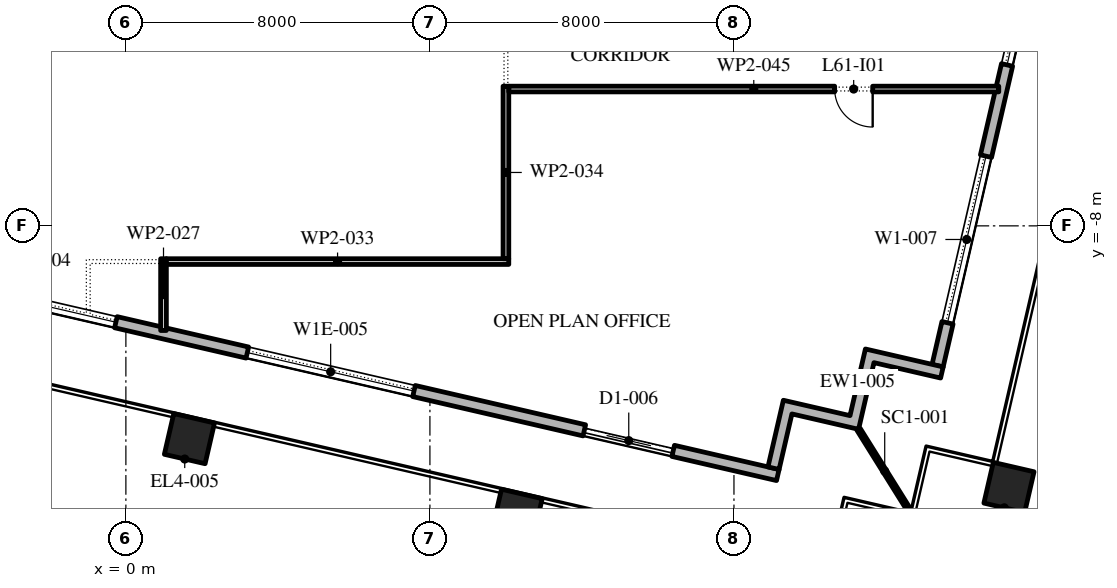
"""IFC4 building model, lengths in metres.
Left out: names, types, materials, properties, quantities, classifications, styles, units other than length and angle.
Written with IfcOpenShell. Run it as: python <this file> out.ifc"""

import sys

from ifc_helpers import new_model, si_unit, direction, frame, frame_2d, origin, origin_2d, place, context, subcontext, project, spatial, polyline, rectangle, outline, extrude, element, fill, save


model = new_model("IFC4")
c1 = context("Model", 3, precision=1e-05, world=origin(), true_north=direction((0.0, 1.0)))
c2 = subcontext(c1, "Body", "Model", "MODEL_VIEW")
j1 = project(units=[si_unit("LENGTHUNIT", "METRE"), si_unit("PLANEANGLEUNIT", "RADIAN")], contexts=[c1])
p1 = place(None, origin())
s1 = spatial("IfcSite", under=j1, at=p1, CompositionType="ELEMENT")
p2 = place(p1, origin())
s2 = spatial("IfcBuilding", under=s1, at=p2, CompositionType="ELEMENT")
p3 = place(p2, frame((0.0, 0.0, 280.8)))
s3 = spatial("IfcBuildingStorey", under=s2, at=p3, CompositionType="ELEMENT", Elevation=280.8)
for number, where, z_axis, x_axis in (
    (1, (1.672, -13.599, 0.0), (0.0, 0.0, 1.0), (0.974, -0.225, 0.0)),
    (2, (10.295, -15.59, 0.0), (0.0, 0.0, 1.0), (0.974, -0.225, 0.0)),
    (3, (23.236, -14.883, 0.0), (0.0, 0.0, 1.0), (0.974, -0.225, 0.0)),
):
    element("IfcColumn", number, at=place(p3, frame(where, z_axis=z_axis, x_axis=x_axis)), inside=s3, PredefinedType="COLUMN", context=c2, shape_type="SweptSolid", body=[
        extrude(rectangle(XDim=1.1, YDim=1.1, at=origin_2d()), origin(), (0.0, 0.0, 1.0), 4.2),
    ])
p4 = place(p3, frame((-29.616, -3.758, 0.0), z_axis=(0.0, 0.0, 1.0), x_axis=(0.974370532314, -0.224949029246, 0.0)))
e4 = element("IfcWall", 4, at=p4, inside=s3, PredefinedType="STANDARD", context=c2, shape_type="SweptSolid", body=[
    extrude(rectangle(XDim=48.0, YDim=0.3, at=frame_2d((24.0, 0.0))), origin(), (0.0, 0.0, 1.0), 4.0),
])
p5 = place(p4, frame((1.625, 0.0, 0.45)))
e5 = element("IfcOpeningElement", 5, at=p5, cuts=e4, PredefinedType="OPENING", context=c2, shape_type="SweptSolid", body=[
    extrude(rectangle(XDim=4.5, YDim=3.05, at=frame_2d((2.25, 1.525))), frame((0.0, 0.16, 0.0), z_axis=(0.0, -1.0, 0.0), x_axis=(1.0, 0.0, 0.0)), (0.0, 0.0, 1.0), 0.32),
])
p6 = place(p4, frame((10.575, 0.0, 0.0)))
e6 = element("IfcOpeningElement", 6, at=p6, cuts=e4, PredefinedType="OPENING", context=c2, shape_type="SweptSolid", body=[
    extrude(rectangle(XDim=2.4, YDim=3.5, at=frame_2d((1.2, 1.75))), frame((0.0, 0.16, 0.0), z_axis=(0.0, -1.0, 0.0), x_axis=(1.0, 0.0, 0.0)), (0.0, 0.0, 1.0), 0.32),
])
p7 = place(p4, frame((17.575, 0.0, 0.45)))
e7 = element("IfcOpeningElement", 7, at=p7, cuts=e4, PredefinedType="OPENING", context=c2, shape_type="SweptSolid", body=[
    extrude(rectangle(XDim=4.5, YDim=3.0, at=frame_2d((2.25, 1.5))), frame((0.0, 0.16, 0.0), z_axis=(0.0, -1.0, 0.0), x_axis=(1.0, 0.0, 0.0)), (0.0, 0.0, 1.0), 0.32),
])
p8 = place(p4, frame((25.625, 0.0, 0.45)))
e8 = element("IfcOpeningElement", 8, at=p8, cuts=e4, PredefinedType="OPENING", context=c2, shape_type="SweptSolid", body=[
    extrude(rectangle(XDim=4.5, YDim=2.95, at=frame_2d((2.25, 1.475))), frame((0.0, 0.16, 0.0), z_axis=(0.0, -1.0, 0.0), x_axis=(1.0, 0.0, 0.0)), (0.0, 0.0, 1.0), 0.32),
])
p9 = place(p4, frame((33.675, 0.0, 0.45)))
e9 = element("IfcOpeningElement", 9, at=p9, cuts=e4, PredefinedType="OPENING", context=c2, shape_type="SweptSolid", body=[
    extrude(rectangle(XDim=4.5, YDim=2.825, at=frame_2d((2.25, 1.413))), frame((0.0, 0.16, 0.0), z_axis=(0.0, -1.0, 0.0), x_axis=(1.0, 0.0, 0.0)), (0.0, 0.0, 1.0), 0.32),
])
p10 = place(p4, frame((42.775, 0.0, 0.0)))
e10 = element("IfcOpeningElement", 10, at=p10, cuts=e4, PredefinedType="OPENING", context=c2, shape_type="SweptSolid", body=[
    extrude(rectangle(XDim=2.4, YDim=3.5, at=frame_2d((1.2, 1.75))), frame((0.0, 0.16, 0.0), z_axis=(0.0, -1.0, 0.0), x_axis=(1.0, 0.0, 0.0)), (0.0, 0.0, 1.0), 0.32),
])
p11 = place(p3, frame((21.359, -11.678, 0.0), z_axis=(0.0, 0.0, 1.0), x_axis=(0.224949198343, 0.974370493275, 0.0)))
e11 = element("IfcWall", 11, at=p11, inside=s3, PredefinedType="STANDARD", context=c2, shape_type="SweptSolid", body=[
    extrude(rectangle(XDim=49.5, YDim=0.3, at=frame_2d((24.75, 0.0))), origin(), (0.0, 0.0, 1.0), 4.0),
])
p12 = place(p11, frame((1.157, 0.0, 0.45)))
e12 = element("IfcOpeningElement", 12, at=p12, cuts=e11, PredefinedType="OPENING", context=c2, shape_type="SweptSolid", body=[
    extrude(rectangle(XDim=4.5, YDim=3.05, at=frame_2d((2.25, 1.525))), frame((0.0, 0.16, 0.0), z_axis=(0.0, -1.0, 0.0), x_axis=(1.0, 0.0, 0.0)), (0.0, 0.0, 1.0), 0.32),
])
p13 = place(p11, frame((8.121, 0.0, 0.45)))
e13 = element("IfcOpeningElement", 13, at=p13, cuts=e11, PredefinedType="OPENING", context=c2, shape_type="SweptSolid", body=[
    extrude(rectangle(XDim=4.5, YDim=3.05, at=frame_2d((2.25, 1.525))), frame((0.0, 0.16, 0.0), z_axis=(0.0, -1.0, 0.0), x_axis=(1.0, 0.0, 0.0)), (0.0, 0.0, 1.0), 0.32),
])
p14 = place(p11, frame((15.236, 0.0, 0.45)))
e14 = element("IfcOpeningElement", 14, at=p14, cuts=e11, PredefinedType="OPENING", context=c2, shape_type="SweptSolid", body=[
    extrude(rectangle(XDim=4.5, YDim=3.05, at=frame_2d((2.25, 1.525))), frame((0.0, 0.16, 0.0), z_axis=(0.0, -1.0, 0.0), x_axis=(1.0, 0.0, 0.0)), (0.0, 0.0, 1.0), 0.32),
])
p15 = place(p11, frame((22.35, 0.0, 0.45)))
e15 = element("IfcOpeningElement", 15, at=p15, cuts=e11, PredefinedType="OPENING", context=c2, shape_type="SweptSolid", body=[
    extrude(rectangle(XDim=4.5, YDim=3.05, at=frame_2d((2.25, 1.525))), frame((0.0, 0.16, 0.0), z_axis=(0.0, -1.0, 0.0), x_axis=(1.0, 0.0, 0.0)), (0.0, 0.0, 1.0), 0.32),
])
p16 = place(p11, frame((29.464, 0.0, 0.45)))
e16 = element("IfcOpeningElement", 16, at=p16, cuts=e11, PredefinedType="OPENING", context=c2, shape_type="SweptSolid", body=[
    extrude(rectangle(XDim=4.5, YDim=2.95, at=frame_2d((2.25, 1.475))), frame((0.0, 0.16, 0.0), z_axis=(0.0, -1.0, 0.0), x_axis=(1.0, 0.0, 0.0)), (0.0, 0.0, 1.0), 0.32),
])
p17 = place(p11, frame((37.628, 0.0, 0.0)))
e17 = element("IfcOpeningElement", 17, at=p17, cuts=e11, PredefinedType="OPENING", context=c2, shape_type="SweptSolid", body=[
    extrude(rectangle(XDim=2.4, YDim=3.325, at=frame_2d((1.2, 1.663))), frame((0.0, 0.16, 0.0), z_axis=(0.0, -1.0, 0.0), x_axis=(1.0, 0.0, 0.0)), (0.0, 0.0, 1.0), 0.32),
])
p18 = place(p11, frame((43.693, 0.0, 0.45)))
e18 = element("IfcOpeningElement", 18, at=p18, cuts=e11, PredefinedType="OPENING", context=c2, shape_type="SweptSolid", body=[
    extrude(rectangle(XDim=4.5, YDim=2.575, at=frame_2d((2.25, 1.288))), frame((0.0, 0.16, 0.0), z_axis=(0.0, -1.0, 0.0), x_axis=(1.0, 0.0, 0.0)), (0.0, 0.0, 1.0), 0.32),
])
p19 = place(p3, origin())
e19 = element("IfcWall", 19, at=p19, inside=s3, PredefinedType="STANDARD", context=c2, shape_type="SweptSolid", body=[
    extrude(outline(polyline([(19.054, -12.993), (19.459, -11.24), (21.505, -11.712), (21.438, -12.004), (19.684, -11.599), (19.279, -13.353), (17.525, -12.948), (17.188, -14.41), (16.895, -14.342), (17.3, -12.588), (19.054, -12.993)])), origin(), (0.0, 0.0, 1.0), 4.0),
])
p20 = place(p3, frame((19.279, -13.353, -0.05), z_axis=(0.0, 0.0, 1.0), x_axis=(0.529914407191, -0.848051131154, 0.0)))
e20 = element("IfcWall", 20, at=p20, inside=s3, PredefinedType="STANDARD", context=c2, shape_type="SweptSolid", body=[
    extrude(rectangle(XDim=2.596, YDim=0.1, at=frame_2d((1.298, 0.0))), origin(), (0.0, 0.0, 1.0), 4.05),
])
p21 = place(p3, frame((0.99, -8.865, 0.0), z_axis=(0.0, 0.0, 1.0), x_axis=(0.0, -1.0, 0.0)))
e21 = element("IfcWall", 21, at=p21, inside=s3, PredefinedType="PARTITIONING", context=c2, shape_type="SweptSolid", body=[
    extrude(rectangle(XDim=1.888, YDim=0.15, at=frame_2d((0.944, 0.0))), origin(), (0.0, 0.0, 1.0), 4.0),
])
p22 = place(p3, frame((10.075, -8.94, 0.0), z_axis=(0.0, 0.0, 1.0), x_axis=(-1.0, 0.0, 0.0)))
e22 = element("IfcWall", 22, at=p22, inside=s3, PredefinedType="PARTITIONING", context=c2, shape_type="SweptSolid", body=[
    extrude(rectangle(XDim=9.01, YDim=0.15, at=frame_2d((4.505, 0.0))), origin(), (0.0, 0.0, 1.0), 4.0),
])
p23 = place(p3, frame((10.0, -4.325, 0.0), z_axis=(0.0, 0.0, 1.0), x_axis=(0.0, -1.0, 0.0)))
e23 = element("IfcWall", 23, at=p23, inside=s3, PredefinedType="PARTITIONING", context=c2, shape_type="SweptSolid", body=[
    extrude(rectangle(XDim=4.54, YDim=0.15, at=frame_2d((2.27, 0.0))), origin(), (0.0, 0.0, 1.0), 4.0),
])
p24 = place(p3, frame((22.968, -4.4, 0.0), z_axis=(0.0, 0.0, 1.0), x_axis=(-1.0, 0.0, 0.0)))
e24 = element("IfcWall", 24, at=p24, inside=s3, PredefinedType="PARTITIONING", context=c2, shape_type="SweptSolid", body=[
    extrude(rectangle(XDim=12.893, YDim=0.15, at=frame_2d((6.447, 0.0))), origin(), (0.0, 0.0, 1.0), 4.0),
])
p25 = place(p24, frame((3.318, 0.0, 0.0)))
e25 = element("IfcOpeningElement", 25, at=p25, cuts=e24, PredefinedType="OPENING", context=c2, shape_type="SweptSolid", body=[
    extrude(rectangle(XDim=1.0, YDim=2.1, at=frame_2d((0.5, 1.05))), frame((0.0, 0.085, 0.0), z_axis=(0.0, -1.0, 0.0), x_axis=(1.0, 0.0, 0.0)), (0.0, 0.0, 1.0), 0.17),
])
p26 = place(p8, origin())
e26 = element("IfcWindow", 26, at=p26, inside=s3, PartitioningType="DOUBLE_PANEL_VERTICAL", PredefinedType="WINDOW", context=c2, shape_type="SweptSolid", body=[
    extrude(rectangle(XDim=4.5, YDim=2.95, at=frame_2d((2.25, 1.475))), frame((0.0, 0.03, 0.0), z_axis=(0.0, -1.0, 0.0), x_axis=(1.0, 0.0, 0.0)), (0.0, 0.0, 1.0), 0.06),
])
fill(e8, e26)
p27 = place(p9, origin())
e27 = element("IfcWindow", 27, at=p27, inside=s3, PartitioningType="DOUBLE_PANEL_VERTICAL", PredefinedType="WINDOW", context=c2, shape_type="SweptSolid", body=[
    extrude(rectangle(XDim=4.5, YDim=2.825, at=frame_2d((2.25, 1.413))), frame((0.0, 0.03, 0.0), z_axis=(0.0, -1.0, 0.0), x_axis=(1.0, 0.0, 0.0)), (0.0, 0.0, 1.0), 0.06),
])
fill(e9, e27)
p28 = place(p10, origin())
e28 = element("IfcDoor", 28, at=p28, inside=s3, OperationType="DOUBLE_DOOR_SLIDING", PredefinedType="DOOR", context=c2, shape_type="SweptSolid", body=[
    extrude(rectangle(XDim=2.4, YDim=3.5, at=frame_2d((1.2, 1.75))), frame((0.0, 0.025, 0.0), z_axis=(0.0, -1.0, 0.0), x_axis=(1.0, 0.0, 0.0)), (0.0, 0.0, 1.0), 0.05),
])
fill(e10, e28)
p29 = place(p12, origin())
e29 = element("IfcWindow", 29, at=p29, inside=s3, PartitioningType="DOUBLE_PANEL_VERTICAL", PredefinedType="WINDOW", context=c2, shape_type="SweptSolid", body=[
    extrude(rectangle(XDim=4.5, YDim=3.05, at=frame_2d((2.25, 1.525))), frame((0.0, 0.03, 0.0), z_axis=(0.0, -1.0, 0.0), x_axis=(1.0, 0.0, 0.0)), (0.0, 0.0, 1.0), 0.06),
])
fill(e12, e29)
p30 = place(p13, origin())
e30 = element("IfcWindow", 30, at=p30, inside=s3, PartitioningType="DOUBLE_PANEL_VERTICAL", PredefinedType="WINDOW", context=c2, shape_type="SweptSolid", body=[
    extrude(rectangle(XDim=4.5, YDim=3.05, at=frame_2d((2.25, 1.525))), frame((0.0, 0.03, 0.0), z_axis=(0.0, -1.0, 0.0), x_axis=(1.0, 0.0, 0.0)), (0.0, 0.0, 1.0), 0.06),
])
fill(e13, e30)
p31 = place(p25, origin())
e31 = element("IfcDoor", 31, at=p31, inside=s3, OperationType="SINGLE_SWING_RIGHT", PredefinedType="DOOR", context=c2, shape_type="SweptSolid", body=[
    extrude(rectangle(XDim=1.0, YDim=2.1, at=frame_2d((0.5, 1.05))), frame((0.0, 0.025, 0.0), z_axis=(0.0, -1.0, 0.0), x_axis=(1.0, 0.0, 0.0)), (0.0, 0.0, 1.0), 0.05),
])
fill(e25, e31)
save(model, sys.argv[1])
